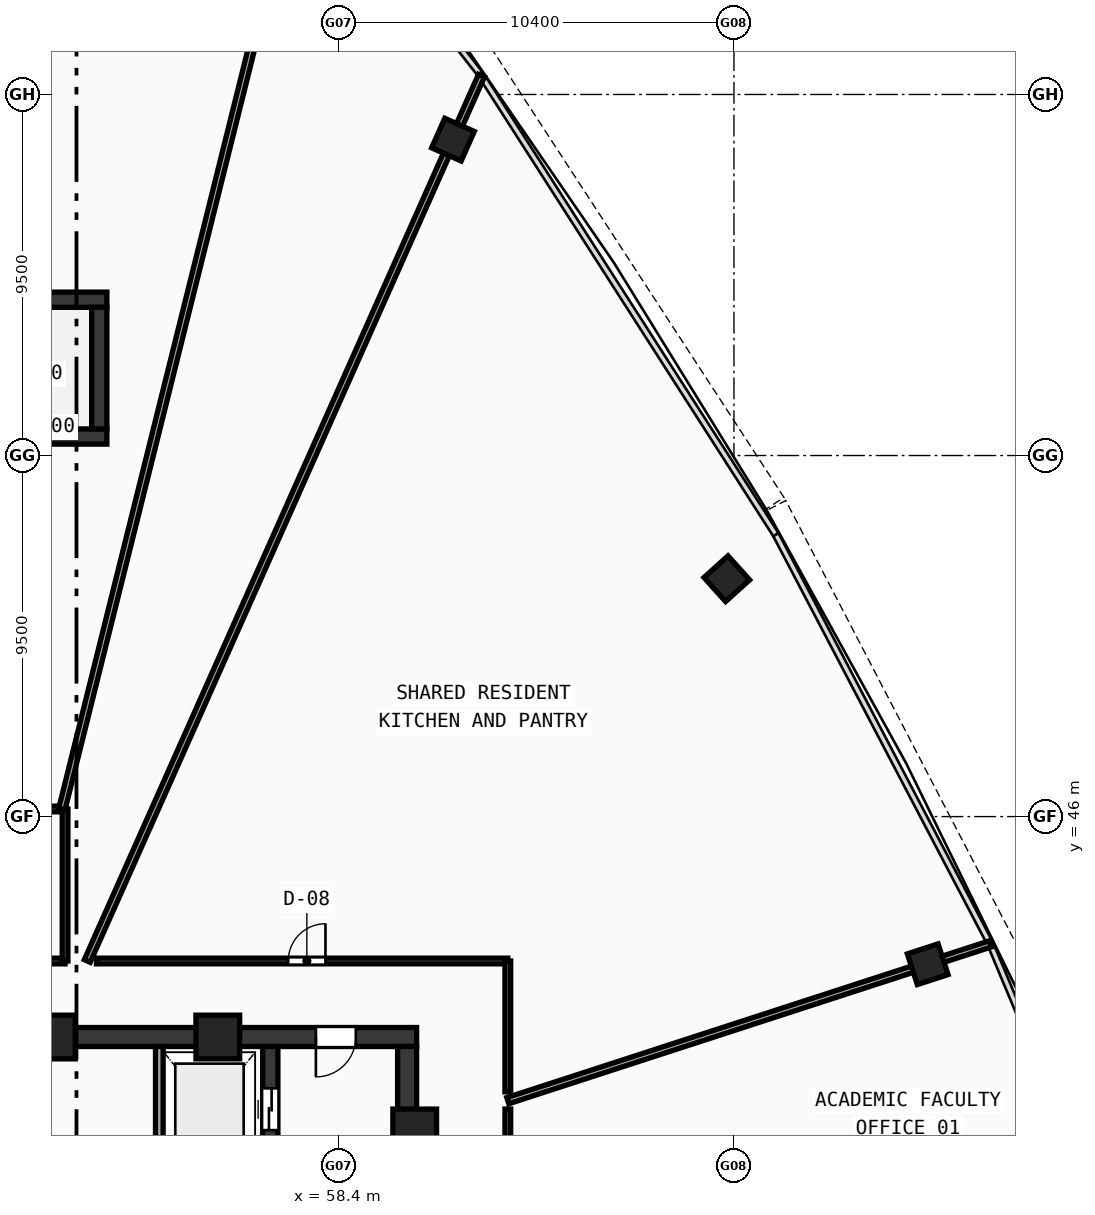
"""IFC4 building model, lengths in metres.
Left out: names, types, materials, properties, quantities, classifications, styles, units other than length and angle.
Written with IfcOpenShell. Run it as: python <this file> out.ifc"""

import sys

from ifc_helpers import new_model, si_unit, direction, frame, frame_2d, origin, origin_with_axes, origin_2d, place, context, subcontext, project, spatial, rectangle, hollow_rectangle, extrude, source, transform, mapped, element, fill, save


model = new_model("IFC4")
c1 = context("Model", 3, precision=1e-05, world=origin(), true_north=direction((0.0, 1.0)))
c2 = subcontext(c1, "Body", "Model", "MODEL_VIEW")
j1 = project(units=[si_unit("LENGTHUNIT", "METRE"), si_unit("PLANEANGLEUNIT", "RADIAN")], contexts=[c1])
p1 = place(None, origin())
s1 = spatial("IfcSite", under=j1, at=p1, CompositionType="ELEMENT")
p2 = place(p1, origin())
s2 = spatial("IfcBuilding", under=s1, at=p2, CompositionType="ELEMENT")
p3 = place(p2, frame((0.0, 0.0, 251.99)))
s3 = spatial("IfcBuildingStorey", under=s2, at=p3, CompositionType="ELEMENT", Elevation=251.99)
p4 = place(p3, frame((49.2, 40.2, 0.0), z_axis=(0.0, 0.0, 1.0), x_axis=(1.0, 0.0, 0.0)))
e1 = element("IfcWall", 1, at=p4, inside=s3, PredefinedType="SHEAR", context=c2, shape_type="SweptSolid", body=[
    extrude(rectangle(XDim=11.25, YDim=0.5, at=frame_2d((5.625, 0.0))), origin(), (0.0, 0.0, 1.0), 3.47),
])
p5 = place(p4, frame((8.6, 0.0, 0.0)))
e2 = element("IfcOpeningElement", 2, at=p5, cuts=e1, PredefinedType="OPENING", context=c2, shape_type="SweptSolid", body=[
    extrude(rectangle(XDim=1.05, YDim=2.1, at=frame_2d((0.525, 1.05))), frame((0.0, 0.26, 0.0), z_axis=(0.0, -1.0, 0.0), x_axis=(1.0, 0.0, 0.0)), (0.0, 0.0, 1.0), 0.52),
])
p6 = place(p3, frame((60.2, 27.75, 0.0), z_axis=(0.0, 0.0, 1.0), x_axis=(0.0, 1.0, 0.0)))
e3 = element("IfcWall", 3, at=p6, inside=s3, PredefinedType="SHEAR", context=c2, shape_type="SweptSolid", body=[
    extrude(rectangle(XDim=12.2, YDim=0.5, at=frame_2d((6.1, 0.0))), origin(), (0.0, 0.0, 1.0), 3.47),
])
p7 = place(p3, frame((56.6, 27.75, 0.0), z_axis=(0.0, 0.0, 1.0), x_axis=(0.0, 1.0, 0.0)))
e4 = element("IfcWall", 4, at=p7, inside=s3, PredefinedType="SHEAR", context=c2, shape_type="SweptSolid", body=[
    extrude(rectangle(XDim=12.2, YDim=0.4, at=frame_2d((6.1, 0.0))), origin(), (0.0, 0.0, 1.0), 3.47),
])
p8 = place(p7, frame((10.0, 0.0, 0.0)))
e5 = element("IfcOpeningElement", 5, at=p8, cuts=e4, PredefinedType="OPENING", context=c2, shape_type="SweptSolid", body=[
    extrude(rectangle(XDim=1.1, YDim=2.1, at=frame_2d((0.55, 1.05))), frame((0.0, 0.21, 0.0), z_axis=(0.0, -1.0, 0.0), x_axis=(1.0, 0.0, 0.0)), (0.0, 0.0, 1.0), 0.42),
])
p9 = place(p3, frame((43.8, 59.6, 0.0), z_axis=(0.0, 0.0, 1.0), x_axis=(1.0, 0.0, 0.0)))
e6 = element("IfcWall", 6, at=p9, inside=s3, PredefinedType="SHEAR", context=c2, shape_type="SweptSolid", body=[
    extrude(rectangle(XDim=8.5, YDim=0.4, at=frame_2d((4.25, 0.0))), origin(), (0.0, 0.0, 1.0), 3.47),
])
p10 = place(p3, frame((43.8, 56.0, 0.0), z_axis=(0.0, 0.0, 1.0), x_axis=(1.0, 0.0, 0.0)))
e7 = element("IfcWall", 7, at=p10, inside=s3, PredefinedType="SHEAR", context=c2, shape_type="SweptSolid", body=[
    extrude(rectangle(XDim=8.5, YDim=0.4, at=frame_2d((4.25, 0.0))), origin(), (0.0, 0.0, 1.0), 3.47),
])
p11 = place(p10, frame((0.62, 0.0, 0.0)))
e8 = element("IfcOpeningElement", 8, at=p11, cuts=e7, PredefinedType="OPENING", context=c2, shape_type="SweptSolid", body=[
    extrude(rectangle(XDim=1.05, YDim=2.1, at=frame_2d((0.525, 1.05))), frame((0.0, 0.21, 0.0), z_axis=(0.0, -1.0, 0.0), x_axis=(1.0, 0.0, 0.0)), (0.0, 0.0, 1.0), 0.42),
])
p12 = place(p3, frame((52.1, 56.2, 0.0), z_axis=(0.0, 0.0, 1.0), x_axis=(0.0, 1.0, 0.0)))
e9 = element("IfcWall", 9, at=p12, inside=s3, PredefinedType="SHEAR", context=c2, shape_type="SweptSolid", body=[
    extrude(rectangle(XDim=3.2, YDim=0.4, at=frame_2d((1.6, 0.0))), origin(), (0.0, 0.0, 1.0), 3.47),
])
m1 = source(origin(), c2, "Body", "SweptSolid", [
    extrude(hollow_rectangle(XDim=1.15, YDim=1.15, WallThickness=0.048, at=origin_2d()), origin(), (0.0, 0.0, 1.0), 3.73),
])
for number, where, z_axis, x_axis in (
    (10, (60.4, 37.729, -0.26), (0.0, 0.0, 1.0), (1.0, 0.0, 0.0)),
    (11, (55.219, 40.2, -0.26), (0.0, 0.0, 1.0), (1.0, 0.0, 0.0)),
    (12, (50.894, 40.2, -0.26), (0.0, 0.0, 1.0), (1.0, 0.0, 0.0)),
):
    element("IfcColumn", number, at=place(p3, frame(where, z_axis=z_axis, x_axis=x_axis)), inside=s3, PredefinedType="COLUMN", context=c2, shape_type="MappedRepresentation", body=[
        mapped(m1, transform((0.0, 0.0, 0.0), scale=1.0)),
    ])
m2 = source(origin(), c2, "Body", "SweptSolid", [
    extrude(hollow_rectangle(XDim=0.85, YDim=0.85, WallThickness=0.034, at=origin_2d()), origin(), (0.0, 0.0, 1.0), 3.73),
])
for number, where, z_axis, x_axis in (
    (13, (73.899, 42.115, -0.26), (0.0, 0.0, 1.0), (-0.309, 0.951, 0.0)),
    (14, (68.612, 52.259, -0.26), (0.0, 0.0, 1.0), (-0.669, 0.743, 0.0)),
    (15, (61.407, 63.812, -0.26), (0.0, 0.0, 1.0), (-0.914, 0.407, 0.0)),
):
    element("IfcColumn", number, at=place(p3, frame(where, z_axis=z_axis, x_axis=x_axis)), inside=s3, PredefinedType="COLUMN", context=c2, shape_type="MappedRepresentation", body=[
        mapped(m2, transform((0.0, 0.0, 0.0), scale=1.0)),
    ])
p13 = place(p3, frame((53.68, 36.65, 0.0), z_axis=(0.0, 0.0, 1.0), x_axis=(0.0, 1.0, 0.0)))
e16 = element("IfcWall", 16, at=p13, inside=s3, PredefinedType="SOLIDWALL", context=c2, shape_type="SweptSolid", body=[
    extrude(rectangle(XDim=3.3, YDim=0.2, at=frame_2d((1.65, 0.0))), origin(), (0.0, 0.0, 1.0), 3.47),
])
p14 = place(p3, frame((45.85, 42.2, 0.0), z_axis=(0.0, 0.0, 1.0), x_axis=(1.0, 0.0, 0.0)))
e17 = element("IfcWall", 17, at=p14, inside=s3, PredefinedType="PARTITIONING", context=c2, shape_type="SweptSolid", body=[
    extrude(rectangle(XDim=5.35, YDim=0.15, at=frame_2d((2.675, 0.0))), origin(), (0.0, 0.0, 1.0), 3.47),
])
p15 = place(p14, frame((1.4, 0.0, 0.0)))
e18 = element("IfcOpeningElement", 18, at=p15, cuts=e17, PredefinedType="OPENING", context=c2, shape_type="SweptSolid", body=[
    extrude(rectangle(XDim=0.94, YDim=2.1, at=frame_2d((0.47, 1.05))), frame((0.0, 0.085, 0.0), z_axis=(0.0, -1.0, 0.0), x_axis=(1.0, 0.0, 0.0)), (0.0, 0.0, 1.0), 0.17),
])
p16 = place(p3, frame((45.85, 46.2, 0.0), z_axis=(0.0, 0.0, 1.0), x_axis=(1.0, 0.0, 0.0)))
e19 = element("IfcWall", 19, at=p16, inside=s3, PredefinedType="PARTITIONING", context=c2, shape_type="SweptSolid", body=[
    extrude(rectangle(XDim=5.35, YDim=0.15, at=frame_2d((2.675, 0.0))), origin(), (0.0, 0.0, 1.0), 3.47),
])
p17 = place(p3, frame((51.2, 42.2, 0.0), z_axis=(0.0, 0.0, 1.0), x_axis=(0.0, 1.0, 0.0)))
e20 = element("IfcWall", 20, at=p17, inside=s3, PredefinedType="PARTITIONING", context=c2, shape_type="SweptSolid", body=[
    extrude(rectangle(XDim=4.0, YDim=0.15, at=frame_2d((2.0, 0.0))), origin(), (0.0, 0.0, 1.0), 3.47),
])
p18 = place(p3, frame((62.85, 38.525, 0.0), z_axis=(0.0, 0.0, 1.0), x_axis=(0.951055435747, 0.30902031994, 0.0)))
e21 = element("IfcWall", 21, at=p18, inside=s3, PredefinedType="PARTITIONING", context=c2, shape_type="SweptSolid", body=[
    extrude(rectangle(XDim=13.349, YDim=0.17, at=frame_2d((6.675, 0.0))), origin(), (0.0, 0.0, 1.0), 2.82),
])
p19 = place(p3, frame((51.784, 42.2, 0.0), z_axis=(0.0, 0.0, 1.0), x_axis=(0.406736188948, 0.913545659833, 0.0)))
e22 = element("IfcWall", 22, at=p19, inside=s3, PredefinedType="PARTITIONING", context=c2, shape_type="SweptSolid", body=[
    extrude(rectangle(XDim=25.501, YDim=0.17, at=frame_2d((12.75, 0.0))), origin(), (0.0, 0.0, 1.0), 2.82),
])
p20 = place(p3, frame((51.117, 46.2, 0.0), z_axis=(0.0, 0.0, 1.0), x_axis=(0.241915360039, 0.970297355751, 0.0)))
e23 = element("IfcWall", 23, at=p20, inside=s3, PredefinedType="PARTITIONING", context=c2, shape_type="SweptSolid", body=[
    extrude(rectangle(XDim=26.119, YDim=0.17, at=frame_2d((13.06, 0.0))), origin(), (0.0, 0.0, 1.0), 2.82),
])
p21 = place(p3, frame((52.025, 42.2, 0.0), z_axis=(0.0, 0.0, 1.0), x_axis=(1.0, 0.0, 0.0)))
e24 = element("IfcWall", 24, at=p21, inside=s3, PredefinedType="PARTITIONING", context=c2, shape_type="SweptSolid", body=[
    extrude(rectangle(XDim=10.825, YDim=0.15, at=frame_2d((5.413, 0.0))), origin(), (0.0, 0.0, 1.0), 2.82),
])
p22 = place(p21, frame((5.047, 0.0, 0.0)))
e25 = element("IfcOpeningElement", 25, at=p22, cuts=e24, PredefinedType="OPENING", context=c2, shape_type="SweptSolid", body=[
    extrude(rectangle(XDim=0.98, YDim=2.12, at=frame_2d((0.49, 1.06))), frame((0.0, 0.085, 0.0), z_axis=(0.0, -1.0, 0.0), x_axis=(1.0, 0.0, 0.0)), (0.0, 0.0, 1.0), 0.17),
])
p23 = place(p3, frame((62.85, 42.2, 0.0), z_axis=(0.0, 0.0, 1.0), x_axis=(0.0, -1.0, 0.0)))
e26 = element("IfcWall", 26, at=p23, inside=s3, PredefinedType="PARTITIONING", context=c2, shape_type="SweptSolid", body=[
    extrude(rectangle(XDim=3.444, YDim=0.15, at=frame_2d((1.722, 0.0))), origin(), (0.0, 0.0, 1.0), 3.12),
])
p24 = place(p3, frame((62.85, 38.305, 0.0), z_axis=(0.0, 0.0, 1.0), x_axis=(0.0, -1.0, 0.0)))
e27 = element("IfcWall", 27, at=p24, inside=s3, PredefinedType="PARTITIONING", context=c2, shape_type="SweptSolid", body=[
    extrude(rectangle(XDim=3.867, YDim=0.15, at=frame_2d((1.933, 0.0))), origin(), (0.0, 0.0, 1.0), 3.47),
])
p25 = place(p24, frame((1.473, 0.0, 0.0)))
e28 = element("IfcOpeningElement", 28, at=p25, cuts=e27, PredefinedType="OPENING", context=c2, shape_type="SweptSolid", body=[
    extrude(rectangle(XDim=0.92, YDim=2.1, at=frame_2d((0.46, 1.05))), frame((0.0, 0.085, 0.0), z_axis=(0.0, -1.0, 0.0), x_axis=(1.0, 0.0, 0.0)), (0.0, 0.0, 1.0), 0.17),
])
m3 = source(origin(), c2, "Body", "SweptSolid", [
    extrude(rectangle(XDim=1.05, YDim=2.1, at=frame_2d((0.525, 1.05))), frame((0.0, 0.025, 0.0), z_axis=(0.0, -1.0, 0.0), x_axis=(1.0, 0.0, 0.0)), (0.0, 0.0, 1.0), 0.05),
])
p26 = place(p5, frame((1.05, 0.0, 0.0), z_axis=(0.0, 0.0, 1.0), x_axis=(-1.0, 0.0, 0.0)))
e29 = element("IfcDoor", 29, at=p26, inside=s3, OperationType="SINGLE_SWING_RIGHT", PredefinedType="DOOR", context=c2, shape_type="MappedRepresentation", body=[
    mapped(m3, transform((0.0, 0.0, 0.0), scale=1.0)),
])
fill(e2, e29)
m4 = source(origin(), c2, "Body", "SweptSolid", [
    extrude(rectangle(XDim=1.1, YDim=2.1, at=frame_2d((0.55, 1.05))), frame((0.0, 0.025, 0.0), z_axis=(0.0, -1.0, 0.0), x_axis=(1.0, 0.0, 0.0)), (0.0, 0.0, 1.0), 0.05),
])
p27 = place(p8, origin_with_axes())
e30 = element("IfcDoor", 30, at=p27, inside=s3, OperationType="DOUBLE_DOOR_SLIDING", PredefinedType="DOOR", context=c2, shape_type="MappedRepresentation", body=[
    mapped(m4, transform((0.0, 0.0, 0.0), scale=1.0)),
])
fill(e5, e30)
m5 = source(origin(), c2, "Body", "SweptSolid", [
    extrude(rectangle(XDim=0.98, YDim=2.12, at=frame_2d((0.49, 1.06))), frame((0.0, 0.025, 0.0), z_axis=(0.0, -1.0, 0.0), x_axis=(1.0, 0.0, 0.0)), (0.0, 0.0, 1.0), 0.05),
])
p28 = place(p22, origin_with_axes())
e31 = element("IfcDoor", 31, at=p28, inside=s3, OperationType="SINGLE_SWING_RIGHT", PredefinedType="DOOR", context=c2, shape_type="MappedRepresentation", body=[
    mapped(m5, transform((0.0, 0.0, 0.0), scale=1.0)),
])
fill(e25, e31)
save(model, sys.argv[1])
